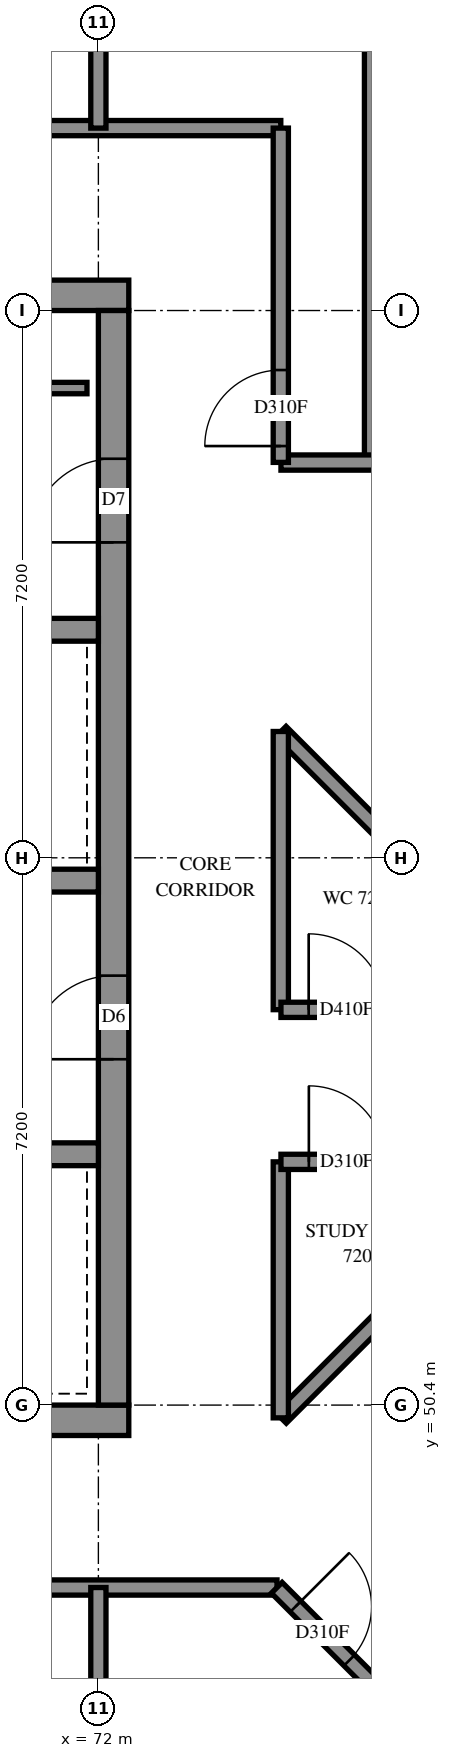
"""IFC4 building model, lengths in metres.
Left out: names, types, materials, properties, quantities, classifications, styles, units other than length and angle.
Written with IfcOpenShell. Run it as: python <this file> out.ifc"""

import sys

from ifc_helpers import new_model, si_unit, direction, frame, frame_2d, origin, place, context, subcontext, project, spatial, rectangle, extrude, element, fill, save


model = new_model("IFC4")
c1 = context("Model", 3, precision=1e-05, world=origin(), true_north=direction((0.0, 1.0)))
c2 = subcontext(c1, "Body", "Model", "MODEL_VIEW")
j1 = project(units=[si_unit("LENGTHUNIT", "METRE"), si_unit("PLANEANGLEUNIT", "RADIAN")], contexts=[c1])
p1 = place(None, origin())
s1 = spatial("IfcSite", under=j1, at=p1, CompositionType="ELEMENT")
p2 = place(p1, origin())
s2 = spatial("IfcBuilding", under=s1, at=p2, CompositionType="ELEMENT")
p3 = place(p2, frame((0.0, 0.0, 264.2)))
s3 = spatial("IfcBuildingStorey", under=s2, at=p3, CompositionType="ELEMENT", Elevation=264.2)
p4 = place(p3, frame((57.2, 50.2, -0.3), z_axis=(0.0, 0.0, 1.0), x_axis=(1.0, 0.0, 0.0)))
e1 = element("IfcWall", 1, at=p4, inside=s3, PredefinedType="SHEAR", context=c2, shape_type="SweptSolid", body=[
    extrude(rectangle(XDim=15.2, YDim=0.4, at=frame_2d((7.6, 0.0))), origin(), (0.0, 0.0, 1.0), 2.7),
])
p5 = place(p3, frame((57.2, 65.0, -0.3), z_axis=(0.0, 0.0, 1.0), x_axis=(1.0, 0.0, 0.0)))
e2 = element("IfcWall", 2, at=p5, inside=s3, PredefinedType="SHEAR", context=c2, shape_type="SweptSolid", body=[
    extrude(rectangle(XDim=15.2, YDim=0.4, at=frame_2d((7.6, 0.0))), origin(), (0.0, 0.0, 1.0), 2.7),
])
p6 = place(p5, frame((10.4, 0.0, 0.3)))
e3 = element("IfcOpeningElement", 3, at=p6, cuts=e2, PredefinedType="OPENING", context=c2, shape_type="SweptSolid", body=[
    extrude(rectangle(XDim=0.8, YDim=2.1, at=frame_2d((0.4, 1.05))), frame((0.0, 0.21, 0.0), z_axis=(0.0, -1.0, 0.0), x_axis=(1.0, 0.0, 0.0)), (0.0, 0.0, 1.0), 0.42),
])
p7 = place(p3, frame((72.2, 50.4, -0.3), z_axis=(0.0, 0.0, 1.0), x_axis=(0.0, 1.0, 0.0)))
e4 = element("IfcWall", 4, at=p7, inside=s3, PredefinedType="SHEAR", context=c2, shape_type="SweptSolid", body=[
    extrude(rectangle(XDim=14.4, YDim=0.4, at=frame_2d((7.2, 0.0))), origin(), (0.0, 0.0, 1.0), 2.7),
])
p8 = place(p7, frame((4.55, 0.0, 0.3)))
e5 = element("IfcOpeningElement", 5, at=p8, cuts=e4, PredefinedType="OPENING", context=c2, shape_type="SweptSolid", body=[
    extrude(rectangle(XDim=1.1, YDim=2.1, at=frame_2d((0.55, 1.05))), frame((0.0, 0.21, 0.0), z_axis=(0.0, -1.0, 0.0), x_axis=(1.0, 0.0, 0.0)), (0.0, 0.0, 1.0), 0.42),
])
p9 = place(p7, frame((11.35, 0.0, 0.3)))
e6 = element("IfcOpeningElement", 6, at=p9, cuts=e4, PredefinedType="OPENING", context=c2, shape_type="SweptSolid", body=[
    extrude(rectangle(XDim=1.1, YDim=2.1, at=frame_2d((0.55, 1.05))), frame((0.0, 0.21, 0.0), z_axis=(0.0, -1.0, 0.0), x_axis=(1.0, 0.0, 0.0)), (0.0, 0.0, 1.0), 0.42),
])
p10 = place(p3, frame((57.6, 53.7, 0.0), z_axis=(0.0, 0.0, 1.0), x_axis=(1.0, 0.0, 0.0)))
e7 = element("IfcWall", 7, at=p10, inside=s3, PredefinedType="SOLIDWALL", context=c2, shape_type="SweptSolid", body=[
    extrude(rectangle(XDim=14.4, YDim=0.3, at=frame_2d((7.2, 0.0))), origin(), (0.0, 0.0, 1.0), 3.1),
])
p11 = place(p10, frame((1.35, 0.0, 0.0)))
e8 = element("IfcOpeningElement", 8, at=p11, cuts=e7, PredefinedType="OPENING", context=c2, shape_type="SweptSolid", body=[
    extrude(rectangle(XDim=0.9, YDim=2.1, at=frame_2d((0.45, 1.05))), frame((0.0, 0.16, 0.0), z_axis=(0.0, -1.0, 0.0), x_axis=(1.0, 0.0, 0.0)), (0.0, 0.0, 1.0), 0.32),
])
p12 = place(p10, frame((4.95, 0.0, 0.0)))
e9 = element("IfcOpeningElement", 9, at=p12, cuts=e7, PredefinedType="OPENING", context=c2, shape_type="SweptSolid", body=[
    extrude(rectangle(XDim=0.9, YDim=2.1, at=frame_2d((0.45, 1.05))), frame((0.0, 0.16, 0.0), z_axis=(0.0, -1.0, 0.0), x_axis=(1.0, 0.0, 0.0)), (0.0, 0.0, 1.0), 0.32),
])
p13 = place(p10, frame((8.55, 0.0, 0.0)))
e10 = element("IfcOpeningElement", 10, at=p13, cuts=e7, PredefinedType="OPENING", context=c2, shape_type="SweptSolid", body=[
    extrude(rectangle(XDim=0.9, YDim=2.1, at=frame_2d((0.45, 1.05))), frame((0.0, 0.16, 0.0), z_axis=(0.0, -1.0, 0.0), x_axis=(1.0, 0.0, 0.0)), (0.0, 0.0, 1.0), 0.32),
])
p14 = place(p10, frame((12.05, 0.0, 0.0)))
e11 = element("IfcOpeningElement", 11, at=p14, cuts=e7, PredefinedType="OPENING", context=c2, shape_type="SweptSolid", body=[
    extrude(rectangle(XDim=1.1, YDim=2.1, at=frame_2d((0.55, 1.05))), frame((0.0, 0.16, 0.0), z_axis=(0.0, -1.0, 0.0), x_axis=(1.0, 0.0, 0.0)), (0.0, 0.0, 1.0), 0.32),
])
p15 = place(p3, frame((57.6, 57.3, 0.0), z_axis=(0.0, 0.0, 1.0), x_axis=(1.0, 0.0, 0.0)))
e12 = element("IfcWall", 12, at=p15, inside=s3, PredefinedType="SOLIDWALL", context=c2, shape_type="SweptSolid", body=[
    extrude(rectangle(XDim=14.4, YDim=0.3, at=frame_2d((7.2, 0.0))), origin(), (0.0, 0.0, 1.0), 3.1),
])
p16 = place(p15, frame((8.55, 0.0, 0.0)))
e13 = element("IfcOpeningElement", 13, at=p16, cuts=e12, PredefinedType="OPENING", context=c2, shape_type="SweptSolid", body=[
    extrude(rectangle(XDim=0.9, YDim=2.1, at=frame_2d((0.45, 1.05))), frame((0.0, 0.16, 0.0), z_axis=(0.0, -1.0, 0.0), x_axis=(1.0, 0.0, 0.0)), (0.0, 0.0, 1.0), 0.32),
])
p17 = place(p15, frame((1.25, 0.0, 0.0)))
e14 = element("IfcOpeningElement", 14, at=p17, cuts=e12, PredefinedType="OPENING", context=c2, shape_type="SweptSolid", body=[
    extrude(rectangle(XDim=1.1, YDim=2.1, at=frame_2d((0.55, 1.05))), frame((0.0, 0.16, 0.0), z_axis=(0.0, -1.0, 0.0), x_axis=(1.0, 0.0, 0.0)), (0.0, 0.0, 1.0), 0.32),
])
p18 = place(p15, frame((4.85, 0.0, 0.0)))
e15 = element("IfcOpeningElement", 15, at=p18, cuts=e12, PredefinedType="OPENING", context=c2, shape_type="SweptSolid", body=[
    extrude(rectangle(XDim=1.1, YDim=2.1, at=frame_2d((0.55, 1.05))), frame((0.0, 0.16, 0.0), z_axis=(0.0, -1.0, 0.0), x_axis=(1.0, 0.0, 0.0)), (0.0, 0.0, 1.0), 0.32),
])
p19 = place(p15, frame((12.05, 0.0, 0.0)))
e16 = element("IfcOpeningElement", 16, at=p19, cuts=e12, PredefinedType="OPENING", context=c2, shape_type="SweptSolid", body=[
    extrude(rectangle(XDim=1.1, YDim=2.1, at=frame_2d((0.55, 1.05))), frame((0.0, 0.16, 0.0), z_axis=(0.0, -1.0, 0.0), x_axis=(1.0, 0.0, 0.0)), (0.0, 0.0, 1.0), 0.32),
])
p20 = place(p3, frame((64.8, 60.6, 0.0), z_axis=(0.0, 0.0, 1.0), x_axis=(1.0, 0.0, 0.0)))
e17 = element("IfcWall", 17, at=p20, inside=s3, PredefinedType="SOLIDWALL", context=c2, shape_type="SweptSolid", body=[
    extrude(rectangle(XDim=7.2, YDim=0.3, at=frame_2d((3.6, 0.0))), origin(), (0.0, 0.0, 1.0), 3.1),
])
p21 = place(p3, frame((64.95, 63.78, 0.0), z_axis=(0.0, 0.0, 1.0), x_axis=(1.0, 0.0, 0.0)))
e18 = element("IfcWall", 18, at=p21, inside=s3, PredefinedType="PARTITIONING", context=c2, shape_type="SweptSolid", body=[
    extrude(rectangle(XDim=6.9, YDim=0.15, at=frame_2d((3.45, 0.0))), origin(), (0.0, 0.0, 1.0), 3.1),
])
p22 = place(p3, frame((55.2, 67.2, 0.0), z_axis=(0.0, 0.0, 1.0), x_axis=(1.0, 0.0, 0.0)))
e19 = element("IfcWall", 19, at=p22, inside=s3, PredefinedType="PARTITIONING", context=c2, shape_type="SweptSolid", body=[
    extrude(rectangle(XDim=19.2, YDim=0.2, at=frame_2d((9.6, 0.0))), origin(), (0.0, 0.0, 1.0), 3.1),
])
p23 = place(p22, frame((4.492, 0.0, 0.0)))
e20 = element("IfcOpeningElement", 20, at=p23, cuts=e19, PredefinedType="OPENING", context=c2, shape_type="SweptSolid", body=[
    extrude(rectangle(XDim=1.0, YDim=2.1, at=frame_2d((0.5, 1.05))), frame((0.0, 0.11, 0.0), z_axis=(0.0, -1.0, 0.0), x_axis=(1.0, 0.0, 0.0)), (0.0, 0.0, 1.0), 0.22),
])
p24 = place(p22, frame((6.567, 0.0, 0.0)))
e21 = element("IfcOpeningElement", 21, at=p24, cuts=e19, PredefinedType="OPENING", context=c2, shape_type="SweptSolid", body=[
    extrude(rectangle(XDim=1.0, YDim=2.1, at=frame_2d((0.5, 1.05))), frame((0.0, 0.11, 0.0), z_axis=(0.0, -1.0, 0.0), x_axis=(1.0, 0.0, 0.0)), (0.0, 0.0, 1.0), 0.22),
])
p25 = place(p22, frame((11.693, 0.0, 0.0)))
e22 = element("IfcOpeningElement", 22, at=p25, cuts=e19, PredefinedType="OPENING", context=c2, shape_type="SweptSolid", body=[
    extrude(rectangle(XDim=1.0, YDim=2.1, at=frame_2d((0.5, 1.05))), frame((0.0, 0.11, 0.0), z_axis=(0.0, -1.0, 0.0), x_axis=(1.0, 0.0, 0.0)), (0.0, 0.0, 1.0), 0.22),
])
p26 = place(p22, frame((13.88, 0.0, 0.0)))
e23 = element("IfcOpeningElement", 23, at=p26, cuts=e19, PredefinedType="OPENING", context=c2, shape_type="SweptSolid", body=[
    extrude(rectangle(XDim=1.0, YDim=2.1, at=frame_2d((0.5, 1.05))), frame((0.0, 0.11, 0.0), z_axis=(0.0, -1.0, 0.0), x_axis=(1.0, 0.0, 0.0)), (0.0, 0.0, 1.0), 0.22),
])
p27 = place(p3, frame((55.2, 48.0, 0.0), z_axis=(0.0, 0.0, 1.0), x_axis=(1.0, 0.0, 0.0)))
e24 = element("IfcWall", 24, at=p27, inside=s3, PredefinedType="PARTITIONING", context=c2, shape_type="SweptSolid", body=[
    extrude(rectangle(XDim=19.15, YDim=0.2, at=frame_2d((9.575, 0.0))), origin(), (0.0, 0.0, 1.0), 3.1),
])
p28 = place(p27, frame((4.475, 0.0, 0.0)))
e25 = element("IfcOpeningElement", 25, at=p28, cuts=e24, PredefinedType="OPENING", context=c2, shape_type="SweptSolid", body=[
    extrude(rectangle(XDim=1.0, YDim=2.1, at=frame_2d((0.5, 1.05))), frame((0.0, 0.11, 0.0), z_axis=(0.0, -1.0, 0.0), x_axis=(1.0, 0.0, 0.0)), (0.0, 0.0, 1.0), 0.22),
])
p29 = place(p27, frame((8.338, 0.0, 0.0)))
e26 = element("IfcOpeningElement", 26, at=p29, cuts=e24, PredefinedType="OPENING", context=c2, shape_type="SweptSolid", body=[
    extrude(rectangle(XDim=1.0, YDim=2.1, at=frame_2d((0.5, 1.05))), frame((0.0, 0.11, 0.0), z_axis=(0.0, -1.0, 0.0), x_axis=(1.0, 0.0, 0.0)), (0.0, 0.0, 1.0), 0.22),
])
p30 = place(p27, frame((13.707, 0.0, 0.0)))
e27 = element("IfcOpeningElement", 27, at=p30, cuts=e24, PredefinedType="OPENING", context=c2, shape_type="SweptSolid", body=[
    extrude(rectangle(XDim=1.0, YDim=2.1, at=frame_2d((0.5, 1.05))), frame((0.0, 0.11, 0.0), z_axis=(0.0, -1.0, 0.0), x_axis=(1.0, 0.0, 0.0)), (0.0, 0.0, 1.0), 0.22),
])
p31 = place(p3, frame((75.6, 62.8, 0.0), z_axis=(0.0, 0.0, 1.0), x_axis=(0.0, 1.0, 0.0)))
e28 = element("IfcWall", 28, at=p31, inside=s3, PredefinedType="PARTITIONING", context=c2, shape_type="SweptSolid", body=[
    extrude(rectangle(XDim=10.036, YDim=0.2, at=frame_2d((5.018, 0.0))), origin(), (0.0, 0.0, 1.0), 3.1),
])
p32 = place(p3, frame((74.402, 62.8, 0.0), z_axis=(0.0, 0.0, 1.0), x_axis=(1.0, 0.0, 0.0)))
e29 = element("IfcWall", 29, at=p32, inside=s3, PredefinedType="PARTITIONING", context=c2, shape_type="SweptSolid", body=[
    extrude(rectangle(XDim=4.798, YDim=0.2, at=frame_2d((2.399, 0.0))), origin(), (0.0, 0.0, 1.0), 3.1),
])
p33 = place(p32, frame((1.723, 0.0, 0.0)))
e30 = element("IfcOpeningElement", 30, at=p33, cuts=e29, PredefinedType="OPENING", context=c2, shape_type="SweptSolid", body=[
    extrude(rectangle(XDim=1.0, YDim=2.1, at=frame_2d((0.5, 1.05))), frame((0.0, 0.11, 0.0), z_axis=(0.0, -1.0, 0.0), x_axis=(1.0, 0.0, 0.0)), (0.0, 0.0, 1.0), 0.22),
])
p34 = place(p3, frame((74.401, 50.233, 0.0), z_axis=(0.0, 0.0, 1.0), x_axis=(0.7071067812, 0.7071067812, 0.0)))
e31 = element("IfcWall", 31, at=p34, inside=s3, PredefinedType="PARTITIONING", context=c2, shape_type="SweptSolid", body=[
    extrude(rectangle(XDim=4.76, YDim=0.2, at=frame_2d((2.38, 0.0))), origin(), (0.0, 0.0, 1.0), 3.1),
])
p35 = place(p3, frame((74.347, 47.997, 0.0), z_axis=(0.0, 0.0, 1.0), x_axis=(0.7071067812, -0.7071067812, 0.0)))
e32 = element("IfcWall", 32, at=p35, inside=s3, PredefinedType="PARTITIONING", context=c2, shape_type="SweptSolid", body=[
    extrude(rectangle(XDim=4.596, YDim=0.2, at=frame_2d((2.298, 0.0))), origin(), (0.0, 0.0, 1.0), 3.1),
])
p36 = place(p35, frame((0.35, 0.0, 0.0)))
e33 = element("IfcOpeningElement", 33, at=p36, cuts=e32, PredefinedType="OPENING", context=c2, shape_type="SweptSolid", body=[
    extrude(rectangle(XDim=1.0, YDim=2.1, at=frame_2d((0.5, 1.05))), frame((0.0, 0.11, 0.0), z_axis=(0.0, -1.0, 0.0), x_axis=(1.0, 0.0, 0.0)), (0.0, 0.0, 1.0), 0.22),
])
p37 = place(p3, frame((74.399, 59.259, 0.0), z_axis=(0.0, 0.0, 1.0), x_axis=(0.7071067812, -0.7071067812, 0.0)))
e34 = element("IfcWall", 34, at=p37, inside=s3, PredefinedType="PARTITIONING", context=c2, shape_type="SweptSolid", body=[
    extrude(rectangle(XDim=4.508, YDim=0.2, at=frame_2d((2.254, 0.0))), origin(), (0.0, 0.0, 1.0), 3.1),
])
p38 = place(p3, frame((72.0, 43.55, 0.0), z_axis=(0.0, 0.0, 1.0), x_axis=(0.0, 1.0, 0.0)))
e35 = element("IfcWall", 35, at=p38, inside=s3, PredefinedType="PARTITIONING", context=c2, shape_type="SweptSolid", body=[
    extrude(rectangle(XDim=4.45, YDim=0.2, at=frame_2d((2.225, 0.0))), origin(), (0.0, 0.0, 1.0), 3.1),
])
p39 = place(p3, frame((74.4, 62.802, 0.0), z_axis=(0.0, 0.0, 1.0), x_axis=(0.0, 1.0, 0.0)))
e36 = element("IfcWall", 36, at=p39, inside=s3, PredefinedType="PARTITIONING", context=c2, shape_type="SweptSolid", body=[
    extrude(rectangle(XDim=4.398, YDim=0.2, at=frame_2d((2.199, 0.0))), origin(), (0.0, 0.0, 1.0), 3.1),
])
p40 = place(p39, frame((0.215, 0.0, 0.0)))
e37 = element("IfcOpeningElement", 37, at=p40, cuts=e36, PredefinedType="OPENING", context=c2, shape_type="SweptSolid", body=[
    extrude(rectangle(XDim=1.0, YDim=2.1, at=frame_2d((0.5, 1.05))), frame((0.0, 0.11, 0.0), z_axis=(0.0, -1.0, 0.0), x_axis=(1.0, 0.0, 0.0)), (0.0, 0.0, 1.0), 0.22),
])
p41 = place(p3, frame((72.0, 67.2, 0.0), z_axis=(0.0, 0.0, 1.0), x_axis=(0.0, 1.0, 0.0)))
e38 = element("IfcWall", 38, at=p41, inside=s3, PredefinedType="PARTITIONING", context=c2, shape_type="SweptSolid", body=[
    extrude(rectangle(XDim=4.346, YDim=0.2, at=frame_2d((2.173, 0.0))), origin(), (0.0, 0.0, 1.0), 3.1),
])
p42 = place(p3, frame((74.4, 55.602, 0.0), z_axis=(0.0, 0.0, 1.0), x_axis=(0.0, 1.0, 0.0)))
e39 = element("IfcWall", 39, at=p42, inside=s3, PredefinedType="PARTITIONING", context=c2, shape_type="SweptSolid", body=[
    extrude(rectangle(XDim=3.66, YDim=0.2, at=frame_2d((1.83, 0.0))), origin(), (0.0, 0.0, 1.0), 3.1),
])
p43 = place(p3, frame((74.4, 50.232, 0.0), z_axis=(0.0, 0.0, 1.0), x_axis=(0.0, 1.0, 0.0)))
e40 = element("IfcWall", 40, at=p43, inside=s3, PredefinedType="PARTITIONING", context=c2, shape_type="SweptSolid", body=[
    extrude(rectangle(XDim=3.368, YDim=0.2, at=frame_2d((1.684, 0.0))), origin(), (0.0, 0.0, 1.0), 3.1),
])
p44 = place(p3, frame((74.402, 53.6, 0.0), z_axis=(0.0, 0.0, 1.0), x_axis=(1.0, 0.0, 0.0)))
e41 = element("IfcWall", 41, at=p44, inside=s3, PredefinedType="PARTITIONING", context=c2, shape_type="SweptSolid", body=[
    extrude(rectangle(XDim=3.366, YDim=0.2, at=frame_2d((1.683, 0.0))), origin(), (0.0, 0.0, 1.0), 3.1),
])
p45 = place(p44, frame((0.367, 0.0, 0.0)))
e42 = element("IfcOpeningElement", 42, at=p45, cuts=e41, PredefinedType="OPENING", context=c2, shape_type="SweptSolid", body=[
    extrude(rectangle(XDim=1.0, YDim=2.1, at=frame_2d((0.5, 1.05))), frame((0.0, 0.11, 0.0), z_axis=(0.0, -1.0, 0.0), x_axis=(1.0, 0.0, 0.0)), (0.0, 0.0, 1.0), 0.22),
])
p46 = place(p3, frame((74.402, 55.6, 0.0), z_axis=(0.0, 0.0, 1.0), x_axis=(1.0, 0.0, 0.0)))
e43 = element("IfcWall", 43, at=p46, inside=s3, PredefinedType="PARTITIONING", context=c2, shape_type="SweptSolid", body=[
    extrude(rectangle(XDim=2.864, YDim=0.2, at=frame_2d((1.432, 0.0))), origin(), (0.0, 0.0, 1.0), 3.1),
])
p47 = place(p46, frame((0.365, 0.0, 0.0)))
e44 = element("IfcOpeningElement", 44, at=p47, cuts=e43, PredefinedType="OPENING", context=c2, shape_type="SweptSolid", body=[
    extrude(rectangle(XDim=1.0, YDim=2.1, at=frame_2d((0.5, 1.05))), frame((0.0, 0.11, 0.0), z_axis=(0.0, -1.0, 0.0), x_axis=(1.0, 0.0, 0.0)), (0.0, 0.0, 1.0), 0.22),
])
p48 = place(p8, origin())
e45 = element("IfcDoor", 45, at=p48, inside=s3, OperationType="DOUBLE_DOOR_SINGLE_SWING", PredefinedType="DOOR", context=c2, shape_type="SweptSolid", body=[
    extrude(rectangle(XDim=1.1, YDim=2.1, at=frame_2d((0.55, 1.05))), frame((0.0, 0.025, 0.0), z_axis=(0.0, -1.0, 0.0), x_axis=(1.0, 0.0, 0.0)), (0.0, 0.0, 1.0), 0.05),
])
fill(e5, e45)
p49 = place(p9, origin())
e46 = element("IfcDoor", 46, at=p49, inside=s3, OperationType="SINGLE_SWING_RIGHT", PredefinedType="DOOR", context=c2, shape_type="SweptSolid", body=[
    extrude(rectangle(XDim=1.1, YDim=2.1, at=frame_2d((0.55, 1.05))), frame((0.0, 0.025, 0.0), z_axis=(0.0, -1.0, 0.0), x_axis=(1.0, 0.0, 0.0)), (0.0, 0.0, 1.0), 0.05),
])
fill(e6, e46)
p50 = place(p36, origin())
e47 = element("IfcDoor", 47, at=p50, inside=s3, OperationType="SINGLE_SWING_LEFT", PredefinedType="DOOR", context=c2, shape_type="SweptSolid", body=[
    extrude(rectangle(XDim=1.0, YDim=2.1, at=frame_2d((0.5, 1.05))), frame((0.0, 0.025, 0.0), z_axis=(0.0, -1.0, 0.0), x_axis=(1.0, 0.0, 0.0)), (0.0, 0.0, 1.0), 0.05),
])
fill(e33, e47)
p51 = place(p45, origin())
e48 = element("IfcDoor", 48, at=p51, inside=s3, OperationType="SINGLE_SWING_RIGHT", PredefinedType="DOOR", context=c2, shape_type="SweptSolid", body=[
    extrude(rectangle(XDim=1.0, YDim=2.1, at=frame_2d((0.5, 1.05))), frame((0.0, 0.025, 0.0), z_axis=(0.0, -1.0, 0.0), x_axis=(1.0, 0.0, 0.0)), (0.0, 0.0, 1.0), 0.05),
])
fill(e42, e48)
p52 = place(p47, origin())
e49 = element("IfcDoor", 49, at=p52, inside=s3, OperationType="SINGLE_SWING_LEFT", PredefinedType="DOOR", context=c2, shape_type="SweptSolid", body=[
    extrude(rectangle(XDim=1.0, YDim=2.1, at=frame_2d((0.5, 1.05))), frame((0.0, 0.025, 0.0), z_axis=(0.0, -1.0, 0.0), x_axis=(1.0, 0.0, 0.0)), (0.0, 0.0, 1.0), 0.05),
])
fill(e44, e49)
p53 = place(p40, origin())
e50 = element("IfcDoor", 50, at=p53, inside=s3, OperationType="SINGLE_SWING_RIGHT", PredefinedType="DOOR", context=c2, shape_type="SweptSolid", body=[
    extrude(rectangle(XDim=1.0, YDim=2.1, at=frame_2d((0.5, 1.05))), frame((0.0, 0.025, 0.0), z_axis=(0.0, -1.0, 0.0), x_axis=(1.0, 0.0, 0.0)), (0.0, 0.0, 1.0), 0.05),
])
fill(e37, e50)
save(model, sys.argv[1])
